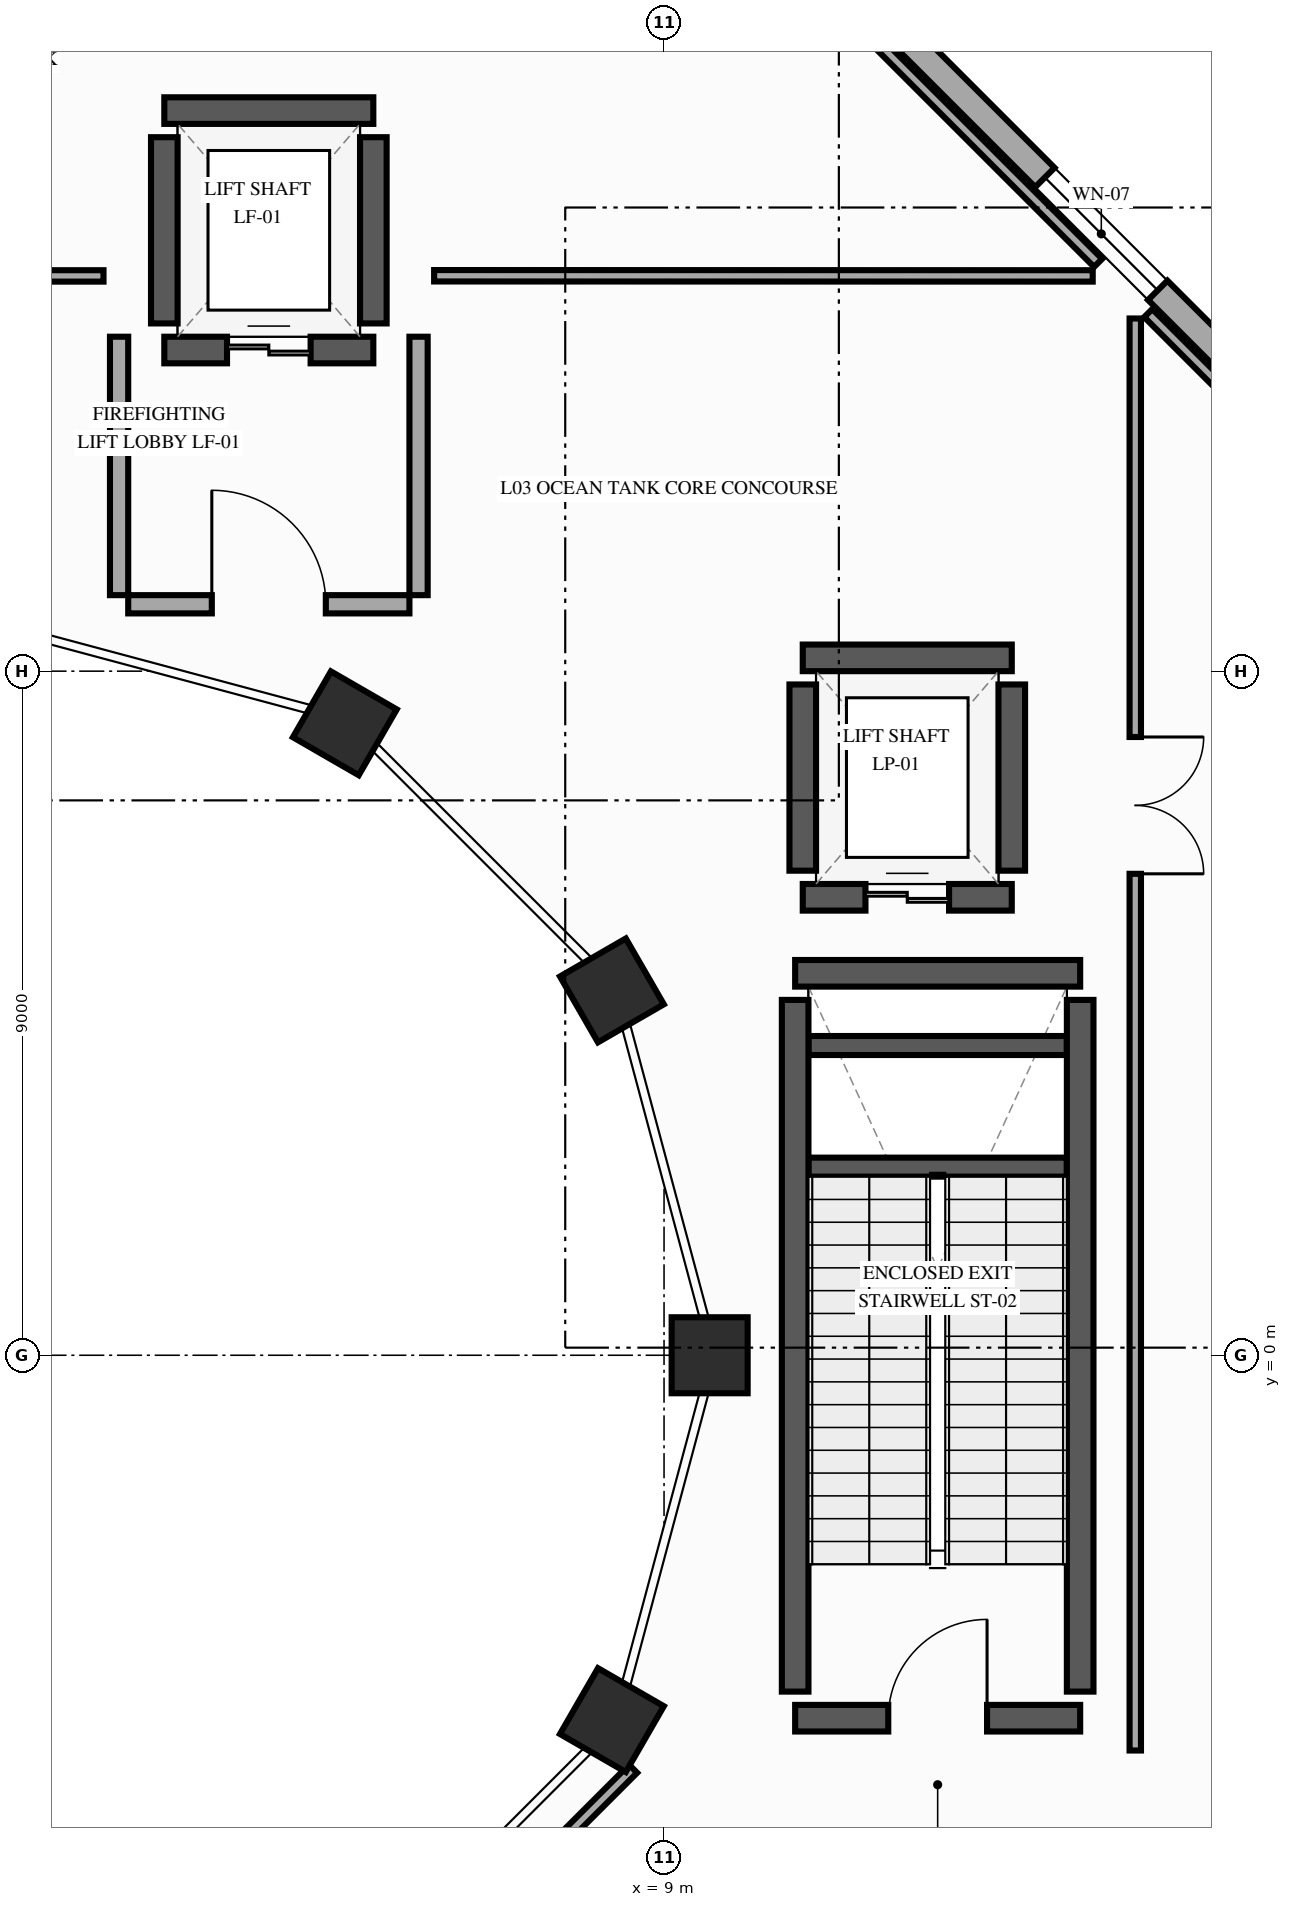
"""IFC4 building model, lengths in metres.
Left out: names, types, materials, properties, quantities, classifications, styles, units other than length and angle.
Written with IfcOpenShell. Run it as: python <this file> out.ifc"""

import sys

from ifc_helpers import new_model, si_unit, direction, frame, frame_2d, origin, origin_2d, place, context, subcontext, project, spatial, rectangle, extrude, element, fill, save


model = new_model("IFC4")
c1 = context("Model", 3, precision=1e-05, world=origin(), true_north=direction((0.0, 1.0)))
c2 = subcontext(c1, "Body", "Model", "MODEL_VIEW")
j1 = project(units=[si_unit("LENGTHUNIT", "METRE"), si_unit("PLANEANGLEUNIT", "RADIAN")], contexts=[c1])
p1 = place(None, origin())
s1 = spatial("IfcSite", under=j1, at=p1, CompositionType="ELEMENT")
p2 = place(p1, origin())
s2 = spatial("IfcBuilding", under=s1, at=p2, CompositionType="ELEMENT")
p3 = place(p2, frame((0.0, 0.0, 16.2)))
s3 = spatial("IfcBuildingStorey", under=s2, at=p3, CompositionType="ELEMENT", Elevation=16.2)
for number, where, z_axis, x_axis in (
    (1, (9.6, 0.0, 0.0), (0.0, 0.0, 1.0), (1.0, 0.0, 0.0)),
    (2, (8.314, 4.8, 0.0), (0.0, 0.0, 1.0), (0.866, 0.5, 0.0)),
    (3, (4.8, 8.314, 0.0), (0.0, 0.0, 1.0), (0.5, 0.866, 0.0)),
    (4, (8.314, -4.8, 0.0), (0.0, 0.0, 1.0), (0.866, -0.5, 0.0)),
):
    element("IfcColumn", number, at=place(p3, frame(where, z_axis=z_axis, x_axis=x_axis)), inside=s3, PredefinedType="COLUMN", context=c2, shape_type="SweptSolid", body=[
        extrude(rectangle(XDim=1.0, YDim=1.0, at=origin_2d()), origin(), (0.0, 0.0, 1.0), 5.4),
    ])
p4 = place(p3, frame((11.221, 18.285, 0.0), z_axis=(0.0, 0.0, 1.0), x_axis=(0.707106781187, -0.707106781187, 0.0)))
e5 = element("IfcWall", 5, at=p4, inside=s3, PredefinedType="SOLIDWALL", context=c2, shape_type="SweptSolid", body=[
    extrude(rectangle(XDim=9.99, YDim=0.36, at=frame_2d((4.995, 0.0))), origin(), (0.0, 0.0, 1.0), 4.385),
])
p5 = place(p4, frame((3.945, 0.0, 0.9)))
e6 = element("IfcOpeningElement", 6, at=p5, cuts=e5, PredefinedType="OPENING", context=c2, shape_type="SweptSolid", body=[
    extrude(rectangle(XDim=2.1, YDim=2.6, at=frame_2d((1.05, 1.3))), frame((0.0, 0.19, 0.0), z_axis=(0.0, -1.0, 0.0), x_axis=(1.0, 0.0, 0.0)), (0.0, 0.0, 1.0), 0.38),
])
for number, where, z_axis, x_axis in (
    (7, (10.9, 2.475, 0.0), (0.0, 0.0, 1.0), (1.0, 0.0, 0.0)),
    (8, (10.9, 4.075, 0.0), (0.0, 0.0, 1.0), (1.0, 0.0, 0.0)),
):
    element("IfcWall", number, at=place(p3, frame(where, z_axis=z_axis, x_axis=x_axis)), inside=s3, PredefinedType="SHEAR", context=c2, shape_type="SweptSolid", body=[
        extrude(rectangle(XDim=3.4, YDim=0.25, at=frame_2d((1.7, 0.0))), origin(), (0.0, 0.0, 1.0), 2.5),
    ])
p6 = place(p3, frame((10.725, -4.775, 0.0), z_axis=(0.0, 0.0, 1.0), x_axis=(1.0, 0.0, 0.0)))
e9 = element("IfcWall", 9, at=p6, inside=s3, PredefinedType="SHEAR", context=c2, shape_type="SweptSolid", body=[
    extrude(rectangle(XDim=3.75, YDim=0.35, at=frame_2d((1.875, 0.0))), origin(), (0.0, 0.0, 1.0), 5.15),
])
p7 = place(p6, frame((1.225, 0.0, 0.0)))
e10 = element("IfcOpeningElement", 10, at=p7, cuts=e9, PredefinedType="OPENING", context=c2, shape_type="SweptSolid", body=[
    extrude(rectangle(XDim=1.3, YDim=2.2, at=frame_2d((0.65, 1.1))), frame((0.0, 0.185, 0.0), z_axis=(0.0, -1.0, 0.0), x_axis=(1.0, 0.0, 0.0)), (0.0, 0.0, 1.0), 0.37),
])
p8 = place(p3, frame((10.725, 5.025, 0.0), z_axis=(0.0, 0.0, 1.0), x_axis=(1.0, 0.0, 0.0)))
e11 = element("IfcWall", 11, at=p8, inside=s3, PredefinedType="SHEAR", context=c2, shape_type="SweptSolid", body=[
    extrude(rectangle(XDim=3.75, YDim=0.35, at=frame_2d((1.875, 0.0))), origin(), (0.0, 0.0, 1.0), 5.15),
])
for number, where, z_axis, x_axis in (
    (12, (10.725, -4.425, 0.0), (0.0, 0.0, 1.0), (0.0, 1.0, 0.0)),
    (13, (14.475, -4.425, 0.0), (0.0, 0.0, 1.0), (0.0, 1.0, 0.0)),
):
    element("IfcWall", number, at=place(p3, frame(where, z_axis=z_axis, x_axis=x_axis)), inside=s3, PredefinedType="SHEAR", context=c2, shape_type="SweptSolid", body=[
        extrude(rectangle(XDim=9.1, YDim=0.35, at=frame_2d((4.55, 0.0))), origin(), (0.0, 0.0, 1.0), 5.15),
    ])
p9 = place(p3, frame((2.425, 13.225, 0.0), z_axis=(0.0, 0.0, 1.0), x_axis=(1.0, 0.0, 0.0)))
e14 = element("IfcWall", 14, at=p9, inside=s3, PredefinedType="SHEAR", context=c2, shape_type="SweptSolid", body=[
    extrude(rectangle(XDim=2.75, YDim=0.35, at=frame_2d((1.375, 0.0))), origin(), (0.0, 0.0, 1.0), 5.15),
])
p10 = place(p9, frame((0.825, 0.0, 0.0)))
e15 = element("IfcOpeningElement", 15, at=p10, cuts=e14, PredefinedType="OPENING", context=c2, shape_type="SweptSolid", body=[
    extrude(rectangle(XDim=1.1, YDim=2.2, at=frame_2d((0.55, 1.1))), frame((0.0, 0.185, 0.0), z_axis=(0.0, -1.0, 0.0), x_axis=(1.0, 0.0, 0.0)), (0.0, 0.0, 1.0), 0.37),
])
p11 = place(p3, frame((5.175, 16.375, 0.0), z_axis=(0.0, 0.0, 1.0), x_axis=(-1.0, 0.0, 0.0)))
e16 = element("IfcWall", 16, at=p11, inside=s3, PredefinedType="SHEAR", context=c2, shape_type="SweptSolid", body=[
    extrude(rectangle(XDim=2.75, YDim=0.35, at=frame_2d((1.375, 0.0))), origin(), (0.0, 0.0, 1.0), 5.15),
])
for number, where, z_axis, x_axis in (
    (17, (2.425, 13.575, 0.0), (0.0, 0.0, 1.0), (0.0, 1.0, 0.0)),
    (18, (5.175, 13.575, 0.0), (0.0, 0.0, 1.0), (0.0, 1.0, 0.0)),
):
    element("IfcWall", number, at=place(p3, frame(where, z_axis=z_axis, x_axis=x_axis)), inside=s3, PredefinedType="SHEAR", context=c2, shape_type="SweptSolid", body=[
        extrude(rectangle(XDim=2.45, YDim=0.35, at=frame_2d((1.225, 0.0))), origin(), (0.0, 0.0, 1.0), 5.15),
    ])
p12 = place(p3, frame((1.95, 9.88, 0.0), z_axis=(0.0, 0.0, 1.0), x_axis=(1.0, 0.0, 0.0)))
e19 = element("IfcWall", 19, at=p12, inside=s3, PredefinedType="PARTITIONING", context=c2, shape_type="SweptSolid", body=[
    extrude(rectangle(XDim=3.7, YDim=0.24, at=frame_2d((1.85, 0.0))), origin(), (0.0, 0.0, 1.0), 4.535),
])
p13 = place(p12, frame((1.1, 0.0, 0.0)))
e20 = element("IfcOpeningElement", 20, at=p13, cuts=e19, PredefinedType="OPENING", context=c2, shape_type="SweptSolid", body=[
    extrude(rectangle(XDim=1.5, YDim=2.2, at=frame_2d((0.75, 1.1))), frame((0.0, 0.13, 0.0), z_axis=(0.0, -1.0, 0.0), x_axis=(1.0, 0.0, 0.0)), (0.0, 0.0, 1.0), 0.26),
])
p14 = place(p3, frame((1.83, 10.0, 0.0), z_axis=(0.0, 0.0, 1.0), x_axis=(0.0, 1.0, 0.0)))
e21 = element("IfcWall", 21, at=p14, inside=s3, PredefinedType="PARTITIONING", context=c2, shape_type="SweptSolid", body=[
    extrude(rectangle(XDim=3.4, YDim=0.24, at=frame_2d((1.7, 0.0))), origin(), (0.0, 0.0, 1.0), 5.1),
])
p15 = place(p3, frame((5.77, 10.0, 0.0), z_axis=(0.0, 0.0, 1.0), x_axis=(0.0, 1.0, 0.0)))
e22 = element("IfcWall", 22, at=p15, inside=s3, PredefinedType="PARTITIONING", context=c2, shape_type="SweptSolid", body=[
    extrude(rectangle(XDim=3.4, YDim=0.24, at=frame_2d((1.7, 0.0))), origin(), (0.0, 0.0, 1.0), 4.535),
])
p16 = place(p3, frame((10.825, 6.025, 0.0), z_axis=(0.0, 0.0, 1.0), x_axis=(1.0, 0.0, 0.0)))
e23 = element("IfcWall", 23, at=p16, inside=s3, PredefinedType="SHEAR", context=c2, shape_type="SweptSolid", body=[
    extrude(rectangle(XDim=2.75, YDim=0.35, at=frame_2d((1.375, 0.0))), origin(), (0.0, 0.0, 1.0), 5.15),
])
p17 = place(p16, frame((0.825, 0.0, 0.0)))
e24 = element("IfcOpeningElement", 24, at=p17, cuts=e23, PredefinedType="OPENING", context=c2, shape_type="SweptSolid", body=[
    extrude(rectangle(XDim=1.1, YDim=2.2, at=frame_2d((0.55, 1.1))), frame((0.0, 0.185, 0.0), z_axis=(0.0, -1.0, 0.0), x_axis=(1.0, 0.0, 0.0)), (0.0, 0.0, 1.0), 0.37),
])
p18 = place(p3, frame((13.575, 9.175, 0.0), z_axis=(0.0, 0.0, 1.0), x_axis=(-1.0, 0.0, 0.0)))
e25 = element("IfcWall", 25, at=p18, inside=s3, PredefinedType="SHEAR", context=c2, shape_type="SweptSolid", body=[
    extrude(rectangle(XDim=2.75, YDim=0.35, at=frame_2d((1.375, 0.0))), origin(), (0.0, 0.0, 1.0), 5.15),
])
for number, where, z_axis, x_axis in (
    (26, (10.825, 6.375, 0.0), (0.0, 0.0, 1.0), (0.0, 1.0, 0.0)),
    (27, (13.575, 6.375, 0.0), (0.0, 0.0, 1.0), (0.0, 1.0, 0.0)),
):
    element("IfcWall", number, at=place(p3, frame(where, z_axis=z_axis, x_axis=x_axis)), inside=s3, PredefinedType="SHEAR", context=c2, shape_type="SweptSolid", body=[
        extrude(rectangle(XDim=2.45, YDim=0.35, at=frame_2d((1.225, 0.0))), origin(), (0.0, 0.0, 1.0), 5.15),
    ])
p19 = place(p3, frame((17.946, 11.135, 0.0), z_axis=(0.0, 0.0, 1.0), x_axis=(-0.706972707094, 0.707240829862, 0.0)))
e28 = element("IfcWall", 28, at=p19, inside=s3, PredefinedType="PARTITIONING", context=c2, shape_type="SweptSolid", body=[
    extrude(rectangle(XDim=3.642, YDim=0.15, at=frame_2d((1.821, 0.0))), origin(), (0.0, 0.0, 1.0), 4.385),
])
p20 = place(p3, frame((15.2, 13.64, 0.0), z_axis=(0.0, 0.0, 1.0), x_axis=(0.0, -1.0, 0.0)))
e29 = element("IfcWall", 29, at=p20, inside=s3, PredefinedType="PARTITIONING", context=c2, shape_type="SweptSolid", body=[
    extrude(rectangle(XDim=18.84, YDim=0.15, at=frame_2d((9.42, 0.0))), origin(), (0.0, 0.0, 1.0), 4.385),
])
p21 = place(p20, frame((5.506, 0.0, 0.0)))
e30 = element("IfcOpeningElement", 30, at=p21, cuts=e29, PredefinedType="OPENING", context=c2, shape_type="SweptSolid", body=[
    extrude(rectangle(XDim=1.8, YDim=2.3, at=frame_2d((0.9, 1.15))), frame((0.0, 0.085, 0.0), z_axis=(0.0, -1.0, 0.0), x_axis=(1.0, 0.0, 0.0)), (0.0, 0.0, 1.0), 0.17),
])
p22 = place(p3, frame((8.593, -5.44, 0.0), z_axis=(0.0, 0.0, 1.0), x_axis=(-0.707106781187, -0.707106781187, 0.0)))
e31 = element("IfcWall", 31, at=p22, inside=s3, PredefinedType="PARTITIONING", context=c2, shape_type="SweptSolid", body=[
    extrude(rectangle(XDim=4.459, YDim=0.15, at=frame_2d((2.229, 0.0))), origin(), (0.0, 0.0, 1.0), 4.535),
])
p23 = place(p3, frame((-14.64, 14.2, 0.0), z_axis=(0.0, 0.0, 1.0), x_axis=(1.0, 0.0, 0.0)))
e32 = element("IfcWall", 32, at=p23, inside=s3, PredefinedType="PARTITIONING", context=c2, shape_type="SweptSolid", body=[
    extrude(rectangle(XDim=16.265, YDim=0.15, at=frame_2d((8.132, 0.0))), origin(), (0.0, 0.0, 1.0), 4.385),
])
p24 = place(p23, frame((7.232, 0.0, 0.0)))
e33 = element("IfcOpeningElement", 33, at=p24, cuts=e32, PredefinedType="OPENING", context=c2, shape_type="SweptSolid", body=[
    extrude(rectangle(XDim=1.8, YDim=2.3, at=frame_2d((0.9, 1.15))), frame((0.0, 0.085, 0.0), z_axis=(0.0, -1.0, 0.0), x_axis=(1.0, 0.0, 0.0)), (0.0, 0.0, 1.0), 0.17),
])
p25 = place(p3, frame((5.975, 14.202, 0.0), z_axis=(0.0, 0.0, 1.0), x_axis=(0.999999974595, -0.000225409253, 0.0)))
e34 = element("IfcWall", 34, at=p25, inside=s3, PredefinedType="PARTITIONING", context=c2, shape_type="SweptSolid", body=[
    extrude(rectangle(XDim=8.665, YDim=0.15, at=frame_2d((4.333, 0.0))), origin(), (0.0, 0.0, 1.0), 4.385),
])
p26 = place(p3, frame((14.711, 14.371, 0.0), z_axis=(0.0, 0.0, 1.0), x_axis=(-0.707203340899, 0.707010208287, 0.0)))
e35 = element("IfcWall", 35, at=p26, inside=s3, PredefinedType="PARTITIONING", context=c2, shape_type="SweptSolid", body=[
    extrude(rectangle(XDim=5.056, YDim=0.15, at=frame_2d((2.528, 0.0))), origin(), (0.0, 0.0, 1.0), 4.385),
])
p27 = place(p5, origin())
e36 = element("IfcWindow", 36, at=p27, inside=s3, PartitioningType="SINGLE_PANEL", PredefinedType="WINDOW", context=c2, shape_type="SweptSolid", body=[
    extrude(rectangle(XDim=2.1, YDim=2.6, at=frame_2d((1.05, 1.3))), frame((0.0, 0.03, 0.0), z_axis=(0.0, -1.0, 0.0), x_axis=(1.0, 0.0, 0.0)), (0.0, 0.0, 1.0), 0.06),
])
fill(e6, e36)
p28 = place(p7, origin())
e37 = element("IfcDoor", 37, at=p28, inside=s3, OperationType="SINGLE_SWING_RIGHT", PredefinedType="DOOR", context=c2, shape_type="SweptSolid", body=[
    extrude(rectangle(XDim=1.3, YDim=2.2, at=frame_2d((0.65, 1.1))), frame((0.0, 0.025, 0.0), z_axis=(0.0, -1.0, 0.0), x_axis=(1.0, 0.0, 0.0)), (0.0, 0.0, 1.0), 0.05),
])
fill(e10, e37)
p29 = place(p10, origin())
e38 = element("IfcDoor", 38, at=p29, inside=s3, OperationType="DOUBLE_DOOR_SLIDING", PredefinedType="DOOR", context=c2, shape_type="SweptSolid", body=[
    extrude(rectangle(XDim=1.1, YDim=2.2, at=frame_2d((0.55, 1.1))), frame((0.0, 0.025, 0.0), z_axis=(0.0, -1.0, 0.0), x_axis=(1.0, 0.0, 0.0)), (0.0, 0.0, 1.0), 0.05),
])
fill(e15, e38)
p30 = place(p13, origin())
e39 = element("IfcDoor", 39, at=p30, inside=s3, OperationType="SINGLE_SWING_LEFT", PredefinedType="DOOR", context=c2, shape_type="SweptSolid", body=[
    extrude(rectangle(XDim=1.5, YDim=2.2, at=frame_2d((0.75, 1.1))), frame((0.0, 0.025, 0.0), z_axis=(0.0, -1.0, 0.0), x_axis=(1.0, 0.0, 0.0)), (0.0, 0.0, 1.0), 0.05),
])
fill(e20, e39)
p31 = place(p17, origin())
e40 = element("IfcDoor", 40, at=p31, inside=s3, OperationType="DOUBLE_DOOR_SLIDING", PredefinedType="DOOR", context=c2, shape_type="SweptSolid", body=[
    extrude(rectangle(XDim=1.1, YDim=2.2, at=frame_2d((0.55, 1.1))), frame((0.0, 0.025, 0.0), z_axis=(0.0, -1.0, 0.0), x_axis=(1.0, 0.0, 0.0)), (0.0, 0.0, 1.0), 0.05),
])
fill(e24, e40)
p32 = place(p21, origin())
e41 = element("IfcDoor", 41, at=p32, inside=s3, OperationType="DOUBLE_DOOR_SINGLE_SWING", PredefinedType="DOOR", context=c2, shape_type="SweptSolid", body=[
    extrude(rectangle(XDim=1.8, YDim=2.3, at=frame_2d((0.9, 1.15))), frame((0.0, 0.025, 0.0), z_axis=(0.0, -1.0, 0.0), x_axis=(1.0, 0.0, 0.0)), (0.0, 0.0, 1.0), 0.05),
])
fill(e30, e41)
save(model, sys.argv[1])
